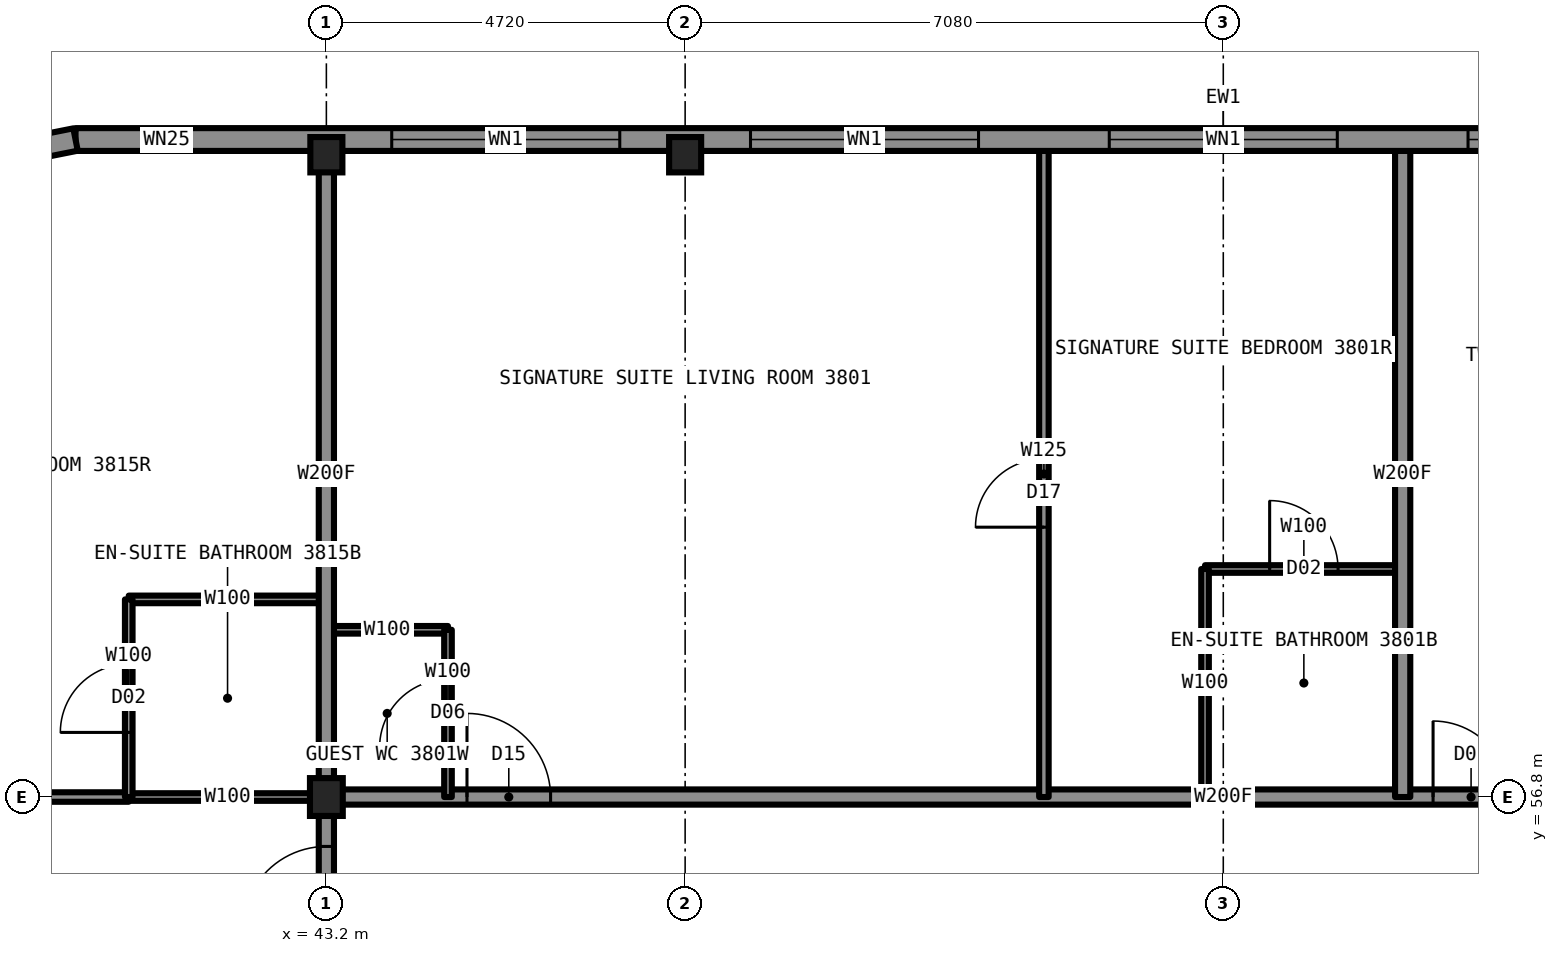
"""IFC4 building model, lengths in metres.
Left out: names, types, materials, properties, quantities, classifications, styles, units other than length and angle.
Written with IfcOpenShell. Run it as: python <this file> out.ifc"""

import sys

from ifc_helpers import new_model, si_unit, direction, frame, frame_2d, origin, origin_2d, place, context, subcontext, project, spatial, rectangle, i_section, extrude, element, fill, save


model = new_model("IFC4")
c1 = context("Model", 3, precision=1e-05, world=origin(), true_north=direction((0.0, 1.0)))
c2 = subcontext(c1, "Body", "Model", "MODEL_VIEW")
j1 = project(units=[si_unit("LENGTHUNIT", "METRE"), si_unit("PLANEANGLEUNIT", "RADIAN")], contexts=[c1])
p1 = place(None, origin())
s1 = spatial("IfcSite", under=j1, at=p1, CompositionType="ELEMENT")
p2 = place(p1, origin())
s2 = spatial("IfcBuilding", under=s1, at=p2, CompositionType="ELEMENT")
p3 = place(p2, frame((0.0, 0.0, 135.4)))
s3 = spatial("IfcBuildingStorey", under=s2, at=p3, CompositionType="ELEMENT", Elevation=135.4)
for number, where, z_axis, x_axis in (
    (1, (43.2, 65.25, 0.0), (0.0, 0.0, 1.0), (1.0, 0.0, 0.0)),
    (2, (47.92, 65.25, 0.0), (0.0, 0.0, 1.0), (1.0, 0.0, 0.0)),
):
    element("IfcColumn", number, at=place(p3, frame(where, z_axis=z_axis, x_axis=x_axis)), inside=s3, PredefinedType="COLUMN", context=c2, shape_type="SweptSolid", body=[
        extrude(i_section(OverallWidth=0.422, OverallDepth=0.465, WebThickness=0.045, FlangeThickness=0.073, at=origin_2d()), origin(), (0.0, 0.0, 1.0), 3.5),
    ])
p4 = place(p3, frame((43.2, 56.8, 0.0), z_axis=(0.0, 0.0, 1.0), x_axis=(1.0, 0.0, 0.0)))
e3 = element("IfcColumn", 3, at=p4, inside=s3, PredefinedType="COLUMN", context=c2, shape_type="SweptSolid", body=[
    extrude(i_section(OverallWidth=0.432, OverallDepth=0.498, WebThickness=0.056, FlangeThickness=0.089, at=origin_2d()), origin(), (0.0, 0.0, 1.0), 3.5),
])
p5 = place(p3, frame((40.6, 56.8, 0.0), z_axis=(0.0, 0.0, 1.0), x_axis=(1.0, 0.0, 0.0)))
e4 = element("IfcWall", 4, at=p5, inside=s3, PredefinedType="PARTITIONING", context=c2, shape_type="SweptSolid", body=[
    extrude(rectangle(XDim=2.6, YDim=0.1, at=frame_2d((1.3, 0.0))), origin(), (0.0, 0.0, 1.0), 2.573),
])
p6 = place(p3, frame((43.2, 56.8, 0.0), z_axis=(0.0, 0.0, 1.0), x_axis=(1.0, 0.0, 0.0)))
e5 = element("IfcWall", 5, at=p6, inside=s3, PredefinedType="PARTITIONING", context=c2, shape_type="SweptSolid", body=[
    extrude(rectangle(XDim=23.6, YDim=0.2, at=frame_2d((11.8, 0.0))), origin(), (0.0, 0.0, 1.0), 3.33),
])
p7 = place(p6, frame((1.85, 0.0, 0.0)))
e6 = element("IfcOpeningElement", 6, at=p7, cuts=e5, PredefinedType="OPENING", context=c2, shape_type="SweptSolid", body=[
    extrude(rectangle(XDim=1.1, YDim=2.2, at=frame_2d((0.55, 1.1))), frame((0.0, 0.11, 0.0), z_axis=(0.0, -1.0, 0.0), x_axis=(1.0, 0.0, 0.0)), (0.0, 0.0, 1.0), 0.22),
])
p8 = place(p6, frame((14.56, 0.0, 0.0)))
e7 = element("IfcOpeningElement", 7, at=p8, cuts=e5, PredefinedType="OPENING", context=c2, shape_type="SweptSolid", body=[
    extrude(rectangle(XDim=1.0, YDim=2.2, at=frame_2d((0.5, 1.1))), frame((0.0, 0.11, 0.0), z_axis=(0.0, -1.0, 0.0), x_axis=(1.0, 0.0, 0.0)), (0.0, 0.0, 1.0), 0.22),
])
p9 = place(p6, frame((21.14, 0.0, 0.0)))
e8 = element("IfcOpeningElement", 8, at=p9, cuts=e5, PredefinedType="OPENING", context=c2, shape_type="SweptSolid", body=[
    extrude(rectangle(XDim=1.0, YDim=2.2, at=frame_2d((0.5, 1.1))), frame((0.0, 0.11, 0.0), z_axis=(0.0, -1.0, 0.0), x_axis=(1.0, 0.0, 0.0)), (0.0, 0.0, 1.0), 0.22),
])
p10 = place(p3, frame((34.7, 56.8, 0.0), z_axis=(0.0, 0.0, 1.0), x_axis=(1.0, 0.0, 0.0)))
e9 = element("IfcWall", 9, at=p10, inside=s3, PredefinedType="PARTITIONING", context=c2, shape_type="SweptSolid", body=[
    extrude(rectangle(XDim=5.9, YDim=0.125, at=frame_2d((2.95, 0.0))), origin(), (0.0, 0.0, 1.0), 2.573),
])
p11 = place(p10, frame((3.85, 0.0, 0.0)))
e10 = element("IfcOpeningElement", 10, at=p11, cuts=e9, PredefinedType="OPENING", context=c2, shape_type="SweptSolid", body=[
    extrude(rectangle(XDim=0.9, YDim=2.2, at=frame_2d((0.45, 1.1))), frame((0.0, 0.073, 0.0), z_axis=(0.0, -1.0, 0.0), x_axis=(1.0, 0.0, 0.0)), (0.0, 0.0, 1.0), 0.145),
])
p12 = place(p3, frame((43.2, 59.0, 0.0), z_axis=(0.0, 0.0, 1.0), x_axis=(1.0, 0.0, 0.0)))
e11 = element("IfcWall", 11, at=p12, inside=s3, PredefinedType="PARTITIONING", context=c2, shape_type="SweptSolid", body=[
    extrude(rectangle(XDim=1.6, YDim=0.1, at=frame_2d((0.8, 0.0))), origin(), (0.0, 0.0, 1.0), 3.33),
])
p13 = place(p3, frame((40.6, 59.4, 0.0), z_axis=(0.0, 0.0, 1.0), x_axis=(1.0, 0.0, 0.0)))
e12 = element("IfcWall", 12, at=p13, inside=s3, PredefinedType="PARTITIONING", context=c2, shape_type="SweptSolid", body=[
    extrude(rectangle(XDim=2.6, YDim=0.1, at=frame_2d((1.3, 0.0))), origin(), (0.0, 0.0, 1.0), 3.33),
])
p14 = place(p3, frame((54.76, 59.8, 0.0), z_axis=(0.0, 0.0, 1.0), x_axis=(1.0, 0.0, 0.0)))
e13 = element("IfcWall", 13, at=p14, inside=s3, PredefinedType="PARTITIONING", context=c2, shape_type="SweptSolid", body=[
    extrude(rectangle(XDim=2.6, YDim=0.1, at=frame_2d((1.3, 0.0))), origin(), (0.0, 0.0, 1.0), 3.33),
])
p15 = place(p14, frame((0.85, 0.0, 0.0)))
e14 = element("IfcOpeningElement", 14, at=p15, cuts=e13, PredefinedType="OPENING", context=c2, shape_type="SweptSolid", body=[
    extrude(rectangle(XDim=0.9, YDim=2.1, at=frame_2d((0.45, 1.05))), frame((0.0, 0.06, 0.0), z_axis=(0.0, -1.0, 0.0), x_axis=(1.0, 0.0, 0.0)), (0.0, 0.0, 1.0), 0.12),
])
p16 = place(p3, frame((54.76, 56.8, 0.0), z_axis=(0.0, 0.0, 1.0), x_axis=(0.0, 1.0, 0.0)))
e15 = element("IfcWall", 15, at=p16, inside=s3, PredefinedType="PARTITIONING", context=c2, shape_type="SweptSolid", body=[
    extrude(rectangle(XDim=3.0, YDim=0.1, at=frame_2d((1.5, 0.0))), origin(), (0.0, 0.0, 1.0), 3.33),
])
p17 = place(p3, frame((44.8, 56.8, 0.0), z_axis=(0.0, 0.0, 1.0), x_axis=(0.0, 1.0, 0.0)))
e16 = element("IfcWall", 16, at=p17, inside=s3, PredefinedType="PARTITIONING", context=c2, shape_type="SweptSolid", body=[
    extrude(rectangle(XDim=2.2, YDim=0.1, at=frame_2d((1.1, 0.0))), origin(), (0.0, 0.0, 1.0), 3.33),
])
p18 = place(p17, frame((0.65, 0.0, 0.0)))
e17 = element("IfcOpeningElement", 17, at=p18, cuts=e16, PredefinedType="OPENING", context=c2, shape_type="SweptSolid", body=[
    extrude(rectangle(XDim=0.9, YDim=2.1, at=frame_2d((0.45, 1.05))), frame((0.0, 0.06, 0.0), z_axis=(0.0, -1.0, 0.0), x_axis=(1.0, 0.0, 0.0)), (0.0, 0.0, 1.0), 0.12),
])
p19 = place(p3, frame((43.2, 33.2, 0.0), z_axis=(0.0, 0.0, 1.0), x_axis=(0.0, 1.0, 0.0)))
e18 = element("IfcWall", 18, at=p19, inside=s3, PredefinedType="PARTITIONING", context=c2, shape_type="SweptSolid", body=[
    extrude(rectangle(XDim=23.6, YDim=0.2, at=frame_2d((11.8, 0.0))), origin(), (0.0, 0.0, 1.0), 3.33),
])
p20 = place(p19, frame((6.98, 0.0, 0.0)))
e19 = element("IfcOpeningElement", 19, at=p20, cuts=e18, PredefinedType="OPENING", context=c2, shape_type="SweptSolid", body=[
    extrude(rectangle(XDim=1.0, YDim=2.2, at=frame_2d((0.5, 1.1))), frame((0.0, 0.11, 0.0), z_axis=(0.0, -1.0, 0.0), x_axis=(1.0, 0.0, 0.0)), (0.0, 0.0, 1.0), 0.22),
])
p21 = place(p19, frame((11.7, 0.0, 0.0)))
e20 = element("IfcOpeningElement", 20, at=p21, cuts=e18, PredefinedType="OPENING", context=c2, shape_type="SweptSolid", body=[
    extrude(rectangle(XDim=1.0, YDim=2.2, at=frame_2d((0.5, 1.1))), frame((0.0, 0.11, 0.0), z_axis=(0.0, -1.0, 0.0), x_axis=(1.0, 0.0, 0.0)), (0.0, 0.0, 1.0), 0.22),
])
p22 = place(p19, frame((15.62, 0.0, 0.0)))
e21 = element("IfcOpeningElement", 21, at=p22, cuts=e18, PredefinedType="OPENING", context=c2, shape_type="SweptSolid", body=[
    extrude(rectangle(XDim=1.0, YDim=2.2, at=frame_2d((0.5, 1.1))), frame((0.0, 0.11, 0.0), z_axis=(0.0, -1.0, 0.0), x_axis=(1.0, 0.0, 0.0)), (0.0, 0.0, 1.0), 0.22),
])
p23 = place(p19, frame((21.85, 0.0, 0.0)))
e22 = element("IfcOpeningElement", 22, at=p23, cuts=e18, PredefinedType="OPENING", context=c2, shape_type="SweptSolid", body=[
    extrude(rectangle(XDim=1.1, YDim=2.2, at=frame_2d((0.55, 1.1))), frame((0.0, 0.11, 0.0), z_axis=(0.0, -1.0, 0.0), x_axis=(1.0, 0.0, 0.0)), (0.0, 0.0, 1.0), 0.22),
])
p24 = place(p19, frame((0.65, 0.0, 0.0)))
e23 = element("IfcOpeningElement", 23, at=p24, cuts=e18, PredefinedType="OPENING", context=c2, shape_type="SweptSolid", body=[
    extrude(rectangle(XDim=1.1, YDim=2.2, at=frame_2d((0.55, 1.1))), frame((0.0, 0.11, 0.0), z_axis=(0.0, -1.0, 0.0), x_axis=(1.0, 0.0, 0.0)), (0.0, 0.0, 1.0), 0.22),
])
p25 = place(p3, frame((43.2, 56.8, 0.0), z_axis=(0.0, 0.0, 1.0), x_axis=(0.0, 1.0, 0.0)))
e24 = element("IfcWall", 24, at=p25, inside=s3, PredefinedType="PARTITIONING", context=c2, shape_type="SweptSolid", body=[
    extrude(rectangle(XDim=8.5, YDim=0.2, at=frame_2d((4.25, 0.0))), origin(), (0.0, 0.0, 1.0), 2.573),
])
p26 = place(p3, frame((40.6, 56.8, 0.0), z_axis=(0.0, 0.0, 1.0), x_axis=(0.0, 1.0, 0.0)))
e25 = element("IfcWall", 25, at=p26, inside=s3, PredefinedType="PARTITIONING", context=c2, shape_type="SweptSolid", body=[
    extrude(rectangle(XDim=2.6, YDim=0.1, at=frame_2d((1.3, 0.0))), origin(), (0.0, 0.0, 1.0), 3.33),
])
p27 = place(p26, frame((0.85, 0.0, 0.0)))
e26 = element("IfcOpeningElement", 26, at=p27, cuts=e25, PredefinedType="OPENING", context=c2, shape_type="SweptSolid", body=[
    extrude(rectangle(XDim=0.9, YDim=2.1, at=frame_2d((0.45, 1.05))), frame((0.0, 0.06, 0.0), z_axis=(0.0, -1.0, 0.0), x_axis=(1.0, 0.0, 0.0)), (0.0, 0.0, 1.0), 0.12),
])
p28 = place(p3, frame((52.64, 56.8, 0.0), z_axis=(0.0, 0.0, 1.0), x_axis=(0.0, 1.0, 0.0)))
e27 = element("IfcWall", 27, at=p28, inside=s3, PredefinedType="PARTITIONING", context=c2, shape_type="SweptSolid", body=[
    extrude(rectangle(XDim=8.5, YDim=0.125, at=frame_2d((4.25, 0.0))), origin(), (0.0, 0.0, 1.0), 3.33),
])
p29 = place(p28, frame((3.55, 0.0, 0.0)))
e28 = element("IfcOpeningElement", 28, at=p29, cuts=e27, PredefinedType="OPENING", context=c2, shape_type="SweptSolid", body=[
    extrude(rectangle(XDim=0.9, YDim=2.2, at=frame_2d((0.45, 1.1))), frame((0.0, 0.073, 0.0), z_axis=(0.0, -1.0, 0.0), x_axis=(1.0, 0.0, 0.0)), (0.0, 0.0, 1.0), 0.145),
])
p30 = place(p3, frame((57.36, 56.8, 0.0), z_axis=(0.0, 0.0, 1.0), x_axis=(0.0, 1.0, 0.0)))
e29 = element("IfcWall", 29, at=p30, inside=s3, PredefinedType="PARTITIONING", context=c2, shape_type="SweptSolid", body=[
    extrude(rectangle(XDim=8.5, YDim=0.2, at=frame_2d((4.25, 0.0))), origin(), (0.0, 0.0, 1.0), 3.33),
])
p31 = place(p3, frame((70.1, 65.45, 0.0), z_axis=(0.0, 0.0, 1.0), x_axis=(-1.0, 0.0, 0.0)))
e30 = element("IfcWall", 30, at=p31, inside=s3, PredefinedType="SOLIDWALL", context=c2, shape_type="SweptSolid", body=[
    extrude(rectangle(XDim=30.2, YDim=0.3, at=frame_2d((15.1, 0.0))), origin(), (0.0, 0.0, 1.0), 2.83),
])
p32 = place(p31, frame((0.85, 0.0, 0.5)))
e31 = element("IfcOpeningElement", 31, at=p32, cuts=e30, PredefinedType="OPENING", context=c2, shape_type="SweptSolid", body=[
    extrude(rectangle(XDim=1.6, YDim=2.0, at=frame_2d((0.8, 1.0))), frame((0.0, 0.16, 0.0), z_axis=(0.0, -1.0, 0.0), x_axis=(1.0, 0.0, 0.0)), (0.0, 0.0, 1.0), 0.32),
])
p33 = place(p31, frame((4.16, 0.0, 0.5)))
e32 = element("IfcOpeningElement", 32, at=p33, cuts=e30, PredefinedType="OPENING", context=c2, shape_type="SweptSolid", body=[
    extrude(rectangle(XDim=1.3, YDim=1.9, at=frame_2d((0.65, 0.95))), frame((0.0, 0.16, 0.0), z_axis=(0.0, -1.0, 0.0), x_axis=(1.0, 0.0, 0.0)), (0.0, 0.0, 1.0), 0.32),
])
p34 = place(p31, frame((8.88, 0.0, 0.5)))
e33 = element("IfcOpeningElement", 33, at=p34, cuts=e30, PredefinedType="OPENING", context=c2, shape_type="SweptSolid", body=[
    extrude(rectangle(XDim=3.0, YDim=2.0, at=frame_2d((1.5, 1.0))), frame((0.0, 0.16, 0.0), z_axis=(0.0, -1.0, 0.0), x_axis=(1.0, 0.0, 0.0)), (0.0, 0.0, 1.0), 0.32),
])
p35 = place(p31, frame((13.6, 0.0, 0.5)))
e34 = element("IfcOpeningElement", 34, at=p35, cuts=e30, PredefinedType="OPENING", context=c2, shape_type="SweptSolid", body=[
    extrude(rectangle(XDim=3.0, YDim=2.0, at=frame_2d((1.5, 1.0))), frame((0.0, 0.16, 0.0), z_axis=(0.0, -1.0, 0.0), x_axis=(1.0, 0.0, 0.0)), (0.0, 0.0, 1.0), 0.32),
])
p36 = place(p31, frame((18.32, 0.0, 0.5)))
e35 = element("IfcOpeningElement", 35, at=p36, cuts=e30, PredefinedType="OPENING", context=c2, shape_type="SweptSolid", body=[
    extrude(rectangle(XDim=3.0, YDim=2.0, at=frame_2d((1.5, 1.0))), frame((0.0, 0.16, 0.0), z_axis=(0.0, -1.0, 0.0), x_axis=(1.0, 0.0, 0.0)), (0.0, 0.0, 1.0), 0.32),
])
p37 = place(p31, frame((24.69, 0.0, 0.5)))
e36 = element("IfcOpeningElement", 36, at=p37, cuts=e30, PredefinedType="OPENING", context=c2, shape_type="SweptSolid", body=[
    extrude(rectangle(XDim=1.3, YDim=1.9, at=frame_2d((0.65, 0.95))), frame((0.0, 0.16, 0.0), z_axis=(0.0, -1.0, 0.0), x_axis=(1.0, 0.0, 0.0)), (0.0, 0.0, 1.0), 0.32),
])
p38 = place(p31, frame((27.75, 0.0, 0.5)))
e37 = element("IfcOpeningElement", 37, at=p38, cuts=e30, PredefinedType="OPENING", context=c2, shape_type="SweptSolid", body=[
    extrude(rectangle(XDim=1.6, YDim=2.0, at=frame_2d((0.8, 1.0))), frame((0.0, 0.16, 0.0), z_axis=(0.0, -1.0, 0.0), x_axis=(1.0, 0.0, 0.0)), (0.0, 0.0, 1.0), 0.32),
])
p39 = place(p31, frame((5.51, 0.0, 0.5)))
e38 = element("IfcOpeningElement", 38, at=p39, cuts=e30, PredefinedType="OPENING", context=c2, shape_type="SweptSolid", body=[
    extrude(rectangle(XDim=0.7, YDim=0.9, at=frame_2d((0.35, 0.45))), frame((0.0, 0.16, 0.0), z_axis=(0.0, -1.0, 0.0), x_axis=(1.0, 0.0, 0.0)), (0.0, 0.0, 1.0), 0.32),
])
p40 = place(p31, frame((23.99, 0.0, 0.5)))
e39 = element("IfcOpeningElement", 39, at=p40, cuts=e30, PredefinedType="OPENING", context=c2, shape_type="SweptSolid", body=[
    extrude(rectangle(XDim=0.7, YDim=0.9, at=frame_2d((0.35, 0.45))), frame((0.0, 0.16, 0.0), z_axis=(0.0, -1.0, 0.0), x_axis=(1.0, 0.0, 0.0)), (0.0, 0.0, 1.0), 0.32),
])
p41 = place(p3, frame((39.9, 65.45, 0.0), z_axis=(0.0, 0.0, 1.0), x_axis=(-0.980787050784, -0.195081421501, 0.0)))
e40 = element("IfcWall", 40, at=p41, inside=s3, PredefinedType="SOLIDWALL", context=c2, shape_type="SweptSolid", body=[
    extrude(rectangle(XDim=2.087, YDim=0.3, at=frame_2d((1.044, 0.0))), origin(), (0.0, 0.0, 1.0), 3.33),
])
p42 = place(p41, frame((0.444, 0.0, 0.5)))
e41 = element("IfcOpeningElement", 41, at=p42, cuts=e40, PredefinedType="OPENING", context=c2, shape_type="SweptSolid", body=[
    extrude(rectangle(XDim=1.2, YDim=2.0, at=frame_2d((0.6, 1.0))), frame((0.0, 0.16, 0.0), z_axis=(0.0, -1.0, 0.0), x_axis=(1.0, 0.0, 0.0)), (0.0, 0.0, 1.0), 0.32),
])
p43 = place(p7, origin())
e42 = element("IfcDoor", 42, at=p43, inside=s3, OperationType="SINGLE_SWING_LEFT", PredefinedType="DOOR", context=c2, shape_type="SweptSolid", body=[
    extrude(rectangle(XDim=1.1, YDim=2.2, at=frame_2d((0.55, 1.1))), frame((0.0, 0.025, 0.0), z_axis=(0.0, -1.0, 0.0), x_axis=(1.0, 0.0, 0.0)), (0.0, 0.0, 1.0), 0.05),
])
fill(e6, e42)
p44 = place(p15, origin())
e43 = element("IfcDoor", 43, at=p44, inside=s3, OperationType="SINGLE_SWING_RIGHT", PredefinedType="DOOR", context=c2, shape_type="SweptSolid", body=[
    extrude(rectangle(XDim=0.9, YDim=2.1, at=frame_2d((0.45, 1.05))), frame((0.0, 0.025, 0.0), z_axis=(0.0, -1.0, 0.0), x_axis=(1.0, 0.0, 0.0)), (0.0, 0.0, 1.0), 0.05),
])
fill(e14, e43)
p45 = place(p29, origin())
e44 = element("IfcDoor", 44, at=p45, inside=s3, OperationType="SINGLE_SWING_LEFT", PredefinedType="DOOR", context=c2, shape_type="SweptSolid", body=[
    extrude(rectangle(XDim=0.9, YDim=2.2, at=frame_2d((0.45, 1.1))), frame((0.0, 0.025, 0.0), z_axis=(0.0, -1.0, 0.0), x_axis=(1.0, 0.0, 0.0)), (0.0, 0.0, 1.0), 0.05),
])
fill(e28, e44)
p46 = place(p18, origin())
e45 = element("IfcDoor", 45, at=p46, inside=s3, OperationType="SINGLE_SWING_LEFT", PredefinedType="DOOR", context=c2, shape_type="SweptSolid", body=[
    extrude(rectangle(XDim=0.9, YDim=2.1, at=frame_2d((0.45, 1.05))), frame((0.0, 0.025, 0.0), z_axis=(0.0, -1.0, 0.0), x_axis=(1.0, 0.0, 0.0)), (0.0, 0.0, 1.0), 0.05),
])
fill(e17, e45)
p47 = place(p8, origin())
e46 = element("IfcDoor", 46, at=p47, inside=s3, OperationType="SINGLE_SWING_LEFT", PredefinedType="DOOR", context=c2, shape_type="SweptSolid", body=[
    extrude(rectangle(XDim=1.0, YDim=2.2, at=frame_2d((0.5, 1.1))), frame((0.0, 0.025, 0.0), z_axis=(0.0, -1.0, 0.0), x_axis=(1.0, 0.0, 0.0)), (0.0, 0.0, 1.0), 0.05),
])
fill(e7, e46)
p48 = place(p23, origin())
e47 = element("IfcDoor", 47, at=p48, inside=s3, OperationType="SINGLE_SWING_LEFT", PredefinedType="DOOR", context=c2, shape_type="SweptSolid", body=[
    extrude(rectangle(XDim=1.1, YDim=2.2, at=frame_2d((0.55, 1.1))), frame((0.0, 0.025, 0.0), z_axis=(0.0, -1.0, 0.0), x_axis=(1.0, 0.0, 0.0)), (0.0, 0.0, 1.0), 0.05),
])
fill(e22, e47)
p49 = place(p27, origin())
e48 = element("IfcDoor", 48, at=p49, inside=s3, OperationType="SINGLE_SWING_RIGHT", PredefinedType="DOOR", context=c2, shape_type="SweptSolid", body=[
    extrude(rectangle(XDim=0.9, YDim=2.1, at=frame_2d((0.45, 1.05))), frame((0.0, 0.025, 0.0), z_axis=(0.0, -1.0, 0.0), x_axis=(1.0, 0.0, 0.0)), (0.0, 0.0, 1.0), 0.05),
])
fill(e26, e48)
p50 = place(p34, origin())
e49 = element("IfcWindow", 49, at=p50, inside=s3, PartitioningType="SINGLE_PANEL", PredefinedType="WINDOW", context=c2, shape_type="SweptSolid", body=[
    extrude(rectangle(XDim=3.0, YDim=2.0, at=frame_2d((1.5, 1.0))), frame((0.0, 0.03, 0.0), z_axis=(0.0, -1.0, 0.0), x_axis=(1.0, 0.0, 0.0)), (0.0, 0.0, 1.0), 0.06),
])
fill(e33, e49)
p51 = place(p35, origin())
e50 = element("IfcWindow", 50, at=p51, inside=s3, PartitioningType="SINGLE_PANEL", PredefinedType="WINDOW", context=c2, shape_type="SweptSolid", body=[
    extrude(rectangle(XDim=3.0, YDim=2.0, at=frame_2d((1.5, 1.0))), frame((0.0, 0.03, 0.0), z_axis=(0.0, -1.0, 0.0), x_axis=(1.0, 0.0, 0.0)), (0.0, 0.0, 1.0), 0.06),
])
fill(e34, e50)
p52 = place(p36, origin())
e51 = element("IfcWindow", 51, at=p52, inside=s3, PartitioningType="SINGLE_PANEL", PredefinedType="WINDOW", context=c2, shape_type="SweptSolid", body=[
    extrude(rectangle(XDim=3.0, YDim=2.0, at=frame_2d((1.5, 1.0))), frame((0.0, 0.03, 0.0), z_axis=(0.0, -1.0, 0.0), x_axis=(1.0, 0.0, 0.0)), (0.0, 0.0, 1.0), 0.06),
])
fill(e35, e51)
p53 = place(p37, origin())
e52 = element("IfcWindow", 52, at=p53, inside=s3, PartitioningType="SINGLE_PANEL", PredefinedType="WINDOW", context=c2, shape_type="SweptSolid", body=[
    extrude(rectangle(XDim=1.3, YDim=1.9, at=frame_2d((0.65, 0.95))), frame((0.0, 0.03, 0.0), z_axis=(0.0, -1.0, 0.0), x_axis=(1.0, 0.0, 0.0)), (0.0, 0.0, 1.0), 0.06),
])
fill(e36, e52)
p54 = place(p38, origin())
e53 = element("IfcWindow", 53, at=p54, inside=s3, PartitioningType="SINGLE_PANEL", PredefinedType="WINDOW", context=c2, shape_type="SweptSolid", body=[
    extrude(rectangle(XDim=1.6, YDim=2.0, at=frame_2d((0.8, 1.0))), frame((0.0, 0.03, 0.0), z_axis=(0.0, -1.0, 0.0), x_axis=(1.0, 0.0, 0.0)), (0.0, 0.0, 1.0), 0.06),
])
fill(e37, e53)
p55 = place(p40, origin())
e54 = element("IfcWindow", 54, at=p55, inside=s3, PartitioningType="SINGLE_PANEL", PredefinedType="WINDOW", context=c2, shape_type="SweptSolid", body=[
    extrude(rectangle(XDim=0.7, YDim=0.9, at=frame_2d((0.35, 0.45))), frame((0.0, 0.03, 0.0), z_axis=(0.0, -1.0, 0.0), x_axis=(1.0, 0.0, 0.0)), (0.0, 0.0, 1.0), 0.06),
])
fill(e39, e54)
save(model, sys.argv[1])
